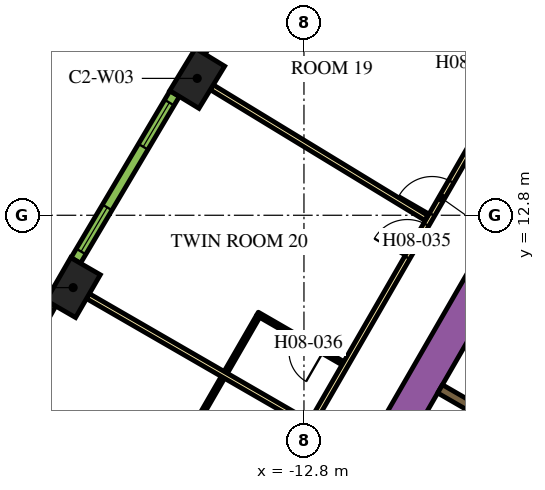
"""IFC4 building model, lengths in metres.
Left out: names, types, materials, properties, quantities, classifications, styles, units other than length and angle.
Written with IfcOpenShell. Run it as: python <this file> out.ifc"""

import sys

from ifc_helpers import new_model, si_unit, direction, frame, frame_2d, origin, origin_2d, place, context, subcontext, project, spatial, rectangle, extrude, element, fill, save


model = new_model("IFC4")
c1 = context("Model", 3, precision=1e-05, world=origin(), true_north=direction((0.0, 1.0)))
c2 = subcontext(c1, "Body", "Model", "MODEL_VIEW")
j1 = project(units=[si_unit("LENGTHUNIT", "METRE"), si_unit("PLANEANGLEUNIT", "RADIAN")], contexts=[c1])
p1 = place(None, origin())
s1 = spatial("IfcSite", under=j1, at=p1, CompositionType="ELEMENT")
p2 = place(p1, origin())
s2 = spatial("IfcBuilding", under=s1, at=p2, CompositionType="ELEMENT")
p3 = place(p2, frame((0.0, 0.0, 111.0)))
s3 = spatial("IfcBuildingStorey", under=s2, at=p3, CompositionType="ELEMENT", Elevation=111.0)
for number, where, z_axis, x_axis in (
    (1, (-15.609, 16.402, 0.0), (0.0, 0.0, 1.0), (-0.52, -0.854, 0.0)),
    (2, (-18.874, 10.897, 0.0), (0.0, 0.0, 1.0), (-0.5, -0.866, 0.0)),
):
    element("IfcColumn", number, at=place(p3, frame(where, z_axis=z_axis, x_axis=x_axis)), inside=s3, PredefinedType="COLUMN", context=c2, shape_type="SweptSolid", body=[
        extrude(rectangle(XDim=1.3, YDim=0.9, at=origin_2d()), origin(), (0.0, 0.0, 1.0), 3.9),
    ])
p4 = place(p3, frame((-15.36, -1.503, 0.0), z_axis=(0.0, 0.0, 1.0), x_axis=(0.50000389221, 0.866023156604, 0.0)))
e3 = element("IfcWall", 3, at=p4, inside=s3, PredefinedType="SOLIDWALL", context=c2, shape_type="SweptSolid", body=[
    extrude(rectangle(XDim=21.0, YDim=0.9, at=frame_2d((10.5, 0.0))), origin(), (0.0, 0.0, 1.0), 3.9),
])
p5 = place(p3, frame((-7.314, 7.132, 0.0), z_axis=(0.0, 0.0, 1.0), x_axis=(-0.866008176907, 0.50002983664, 0.0)))
e4 = element("IfcWall", 4, at=p5, inside=s3, PredefinedType="SOLIDWALL", context=c2, shape_type="SweptSolid", body=[
    extrude(rectangle(XDim=2.2, YDim=0.25, at=frame_2d((1.1, 0.0))), origin(), (0.0, 0.0, 1.0), 3.9),
])
p6 = place(p3, frame((-6.008, 9.144, 0.0), z_axis=(0.0, 0.0, 1.0), x_axis=(-0.500006956611, -0.866021387346, 0.0)))
e5 = element("IfcWall", 5, at=p6, inside=s3, PredefinedType="SOLIDWALL", context=c2, shape_type="SweptSolid", body=[
    extrude(rectangle(XDim=9.83, YDim=0.25, at=frame_2d((4.915, 0.0))), origin(), (0.0, 0.0, 1.0), 3.9),
])
p7 = place(p6, frame((6.985, 0.0, 0.0)))
e6 = element("IfcOpeningElement", 6, at=p7, cuts=e5, PredefinedType="OPENING", context=c2, shape_type="SweptSolid", body=[
    extrude(rectangle(XDim=0.9, YDim=2.1, at=frame_2d((0.45, 1.05))), frame((0.0, 0.135, 0.0), z_axis=(0.0, -1.0, 0.0), x_axis=(1.0, 0.0, 0.0)), (0.0, 0.0, 1.0), 0.27),
])
p8 = place(p3, frame((-19.081, -3.9, 0.0), z_axis=(0.0, 0.0, 1.0), x_axis=(0.499998313975, 0.866026377209, 0.0)))
e7 = element("IfcWall", 7, at=p8, inside=s3, PredefinedType="PARTITIONING", context=c2, shape_type="SweptSolid", body=[
    extrude(rectangle(XDim=25.766, YDim=0.15, at=frame_2d((12.883, 0.0))), origin(), (0.0, 0.0, 1.0), 2.75),
])
p9 = place(p8, frame((19.306, 0.0, 0.0)))
e8 = element("IfcOpeningElement", 8, at=p9, cuts=e7, PredefinedType="OPENING", context=c2, shape_type="SweptSolid", body=[
    extrude(rectangle(XDim=1.0, YDim=2.1, at=frame_2d((0.5, 1.05))), frame((0.0, 0.085, 0.0), z_axis=(0.0, -1.0, 0.0), x_axis=(1.0, 0.0, 0.0)), (0.0, 0.0, 1.0), 0.17),
])
p10 = place(p8, frame((18.0, 0.0, 0.0)))
e9 = element("IfcOpeningElement", 9, at=p10, cuts=e7, PredefinedType="OPENING", context=c2, shape_type="SweptSolid", body=[
    extrude(rectangle(XDim=1.0, YDim=2.1, at=frame_2d((0.5, 1.05))), frame((0.0, 0.085, 0.0), z_axis=(0.0, -1.0, 0.0), x_axis=(1.0, 0.0, 0.0)), (0.0, 0.0, 1.0), 0.17),
])
p11 = place(p8, frame((6.838, 0.0, 0.0)))
e10 = element("IfcOpeningElement", 10, at=p11, cuts=e7, PredefinedType="OPENING", context=c2, shape_type="SweptSolid", body=[
    extrude(rectangle(XDim=1.0, YDim=2.1, at=frame_2d((0.5, 1.05))), frame((0.0, 0.085, 0.0), z_axis=(0.0, -1.0, 0.0), x_axis=(1.0, 0.0, 0.0)), (0.0, 0.0, 1.0), 0.17),
])
p12 = place(p8, frame((4.674, 0.0, 0.0)))
e11 = element("IfcOpeningElement", 11, at=p12, cuts=e7, PredefinedType="OPENING", context=c2, shape_type="SweptSolid", body=[
    extrude(rectangle(XDim=0.9, YDim=2.1, at=frame_2d((0.45, 1.05))), frame((0.0, 0.085, 0.0), z_axis=(0.0, -1.0, 0.0), x_axis=(1.0, 0.0, 0.0)), (0.0, 0.0, 1.0), 0.17),
])
p13 = place(p8, frame((0.18, 0.0, 0.0)))
e12 = element("IfcOpeningElement", 12, at=p13, cuts=e7, PredefinedType="OPENING", context=c2, shape_type="SweptSolid", body=[
    extrude(rectangle(XDim=1.0, YDim=2.1, at=frame_2d((0.5, 1.05))), frame((0.0, 0.085, 0.0), z_axis=(0.0, -1.0, 0.0), x_axis=(1.0, 0.0, 0.0)), (0.0, 0.0, 1.0), 0.17),
])
p14 = place(p3, frame((-18.484, 10.672, 0.0), z_axis=(0.0, 0.0, 1.0), x_axis=(0.866019162053, -0.50001081084, 0.0)))
e13 = element("IfcWall", 13, at=p14, inside=s3, PredefinedType="PARTITIONING", context=c2, shape_type="SweptSolid", body=[
    extrude(rectangle(XDim=6.694, YDim=0.15, at=frame_2d((3.347, 0.0))), origin(), (0.0, 0.0, 1.0), 2.75),
])
p15 = place(p3, frame((-15.225, 16.167, 0.0), z_axis=(0.0, 0.0, 1.0), x_axis=(0.854088713274, -0.520127359266, 0.0)))
e14 = element("IfcWall", 14, at=p15, inside=s3, PredefinedType="PARTITIONING", context=c2, shape_type="SweptSolid", body=[
    extrude(rectangle(XDim=6.611, YDim=0.15, at=frame_2d((3.305, 0.0))), origin(), (0.0, 0.0, 1.0), 2.75),
])
p16 = place(p3, frame((-9.864, 17.615, 0.0), z_axis=(0.0, 0.0, 1.0), x_axis=(0.866019956843, -0.50000943426, 0.0)))
e15 = element("IfcWall", 15, at=p16, inside=s3, PredefinedType="PARTITIONING", context=c2, shape_type="SweptSolid", body=[
    extrude(rectangle(XDim=2.7, YDim=0.1, at=frame_2d((1.35, 0.0))), origin(), (0.0, 0.0, 1.0), 2.75),
])
p17 = place(p16, frame((1.2, 0.0, 0.0)))
e16 = element("IfcOpeningElement", 16, at=p17, cuts=e15, PredefinedType="OPENING", context=c2, shape_type="SweptSolid", body=[
    extrude(rectangle(XDim=0.9, YDim=2.1, at=frame_2d((0.45, 1.05))), frame((0.0, 0.06, 0.0), z_axis=(0.0, -1.0, 0.0), x_axis=(1.0, 0.0, 0.0)), (0.0, 0.0, 1.0), 0.12),
])
p18 = place(p3, frame((-11.774, 8.906, 0.0), z_axis=(0.0, 0.0, 1.0), x_axis=(-0.865997922154, 0.500047596559, 0.0)))
e17 = element("IfcWall", 17, at=p18, inside=s3, PredefinedType="PARTITIONING", context=c2, shape_type="SweptSolid", body=[
    extrude(rectangle(XDim=2.6, YDim=0.1, at=frame_2d((1.3, 0.0))), origin(), (0.0, 0.0, 1.0), 2.75),
])
p19 = place(p18, frame((0.6, 0.0, 0.0)))
e18 = element("IfcOpeningElement", 18, at=p19, cuts=e17, PredefinedType="OPENING", context=c2, shape_type="SweptSolid", body=[
    extrude(rectangle(XDim=0.9, YDim=2.1, at=frame_2d((0.45, 1.05))), frame((0.0, 0.06, 0.0), z_axis=(0.0, -1.0, 0.0), x_axis=(1.0, 0.0, 0.0)), (0.0, 0.0, 1.0), 0.12),
])
for number, where, z_axis, x_axis in (
    (19, (-14.008, 10.138, 0.0), (0.0, 0.0, 1.0), (-0.5, -0.866, 0.0)),
    (20, (-15.783, 7.062, 0.0), (0.0, 0.0, 1.0), (0.5, 0.866, 0.0)),
):
    element("IfcWall", number, at=place(p3, frame(where, z_axis=z_axis, x_axis=x_axis)), inside=s3, PredefinedType="PARTITIONING", context=c2, shape_type="SweptSolid", body=[
        extrude(rectangle(XDim=1.7, YDim=0.1, at=frame_2d((0.85, 0.0))), origin(), (0.0, 0.0, 1.0), 2.75),
    ])
p20 = place(p3, frame((-12.82, 21.439, 0.0), z_axis=(0.0, 0.0, 1.0), x_axis=(-0.530072082134, -0.847952585787, 0.0)))
e21 = element("IfcWall", 21, at=p20, inside=s3, PredefinedType="SOLIDWALL", context=c2, shape_type="SweptSolid", body=[
    extrude(rectangle(XDim=5.1, YDim=0.29, at=frame_2d((2.55, 0.0))), origin(), (0.0, 0.0, 1.0), 3.65),
])
p21 = place(p20, frame((0.273, 0.0, 0.9)))
e22 = element("IfcOpeningElement", 22, at=p21, cuts=e21, PredefinedType="OPENING", context=c2, shape_type="SweptSolid", body=[
    extrude(rectangle(XDim=1.35, YDim=2.15, at=frame_2d((0.675, 1.075))), frame((0.0, 0.155, 0.0), z_axis=(0.0, -1.0, 0.0), x_axis=(1.0, 0.0, 0.0)), (0.0, 0.0, 1.0), 0.31),
])
p22 = place(p20, frame((3.478, 0.0, 0.9)))
e23 = element("IfcOpeningElement", 23, at=p22, cuts=e21, PredefinedType="OPENING", context=c2, shape_type="SweptSolid", body=[
    extrude(rectangle(XDim=1.35, YDim=2.15, at=frame_2d((0.675, 1.075))), frame((0.0, 0.155, 0.0), z_axis=(0.0, -1.0, 0.0), x_axis=(1.0, 0.0, 0.0)), (0.0, 0.0, 1.0), 0.31),
])
p23 = place(p3, frame((-16.203, 15.998, 0.0), z_axis=(0.0, 0.0, 1.0), x_axis=(-0.510054281659, -0.860142214847, 0.0)))
e24 = element("IfcWall", 24, at=p23, inside=s3, PredefinedType="SOLIDWALL", context=c2, shape_type="SweptSolid", body=[
    extrude(rectangle(XDim=5.101, YDim=0.29, at=frame_2d((2.55, 0.0))), origin(), (0.0, 0.0, 1.0), 3.65),
])
p24 = place(p23, frame((0.273, 0.0, 0.9)))
e25 = element("IfcOpeningElement", 25, at=p24, cuts=e24, PredefinedType="OPENING", context=c2, shape_type="SweptSolid", body=[
    extrude(rectangle(XDim=1.35, YDim=2.15, at=frame_2d((0.675, 1.075))), frame((0.0, 0.155, 0.0), z_axis=(0.0, -1.0, 0.0), x_axis=(1.0, 0.0, 0.0)), (0.0, 0.0, 1.0), 0.31),
])
p25 = place(p23, frame((3.478, 0.0, 0.9)))
e26 = element("IfcOpeningElement", 26, at=p25, cuts=e24, PredefinedType="OPENING", context=c2, shape_type="SweptSolid", body=[
    extrude(rectangle(XDim=1.35, YDim=2.15, at=frame_2d((0.675, 1.075))), frame((0.0, 0.155, 0.0), z_axis=(0.0, -1.0, 0.0), x_axis=(1.0, 0.0, 0.0)), (0.0, 0.0, 1.0), 0.31),
])
p26 = place(p3, frame((-19.458, 10.48, 0.0), z_axis=(0.0, 0.0, 1.0), x_axis=(-0.48983164787, -0.87181704316, 0.0)))
e27 = element("IfcWall", 27, at=p26, inside=s3, PredefinedType="SOLIDWALL", context=c2, shape_type="SweptSolid", body=[
    extrude(rectangle(XDim=5.1, YDim=0.29, at=frame_2d((2.55, 0.0))), origin(), (0.0, 0.0, 1.0), 3.65),
])
p27 = place(p26, frame((0.272, 0.0, 0.9)))
e28 = element("IfcOpeningElement", 28, at=p27, cuts=e27, PredefinedType="OPENING", context=c2, shape_type="SweptSolid", body=[
    extrude(rectangle(XDim=1.35, YDim=2.15, at=frame_2d((0.675, 1.075))), frame((0.0, 0.155, 0.0), z_axis=(0.0, -1.0, 0.0), x_axis=(1.0, 0.0, 0.0)), (0.0, 0.0, 1.0), 0.31),
])
p28 = place(p26, frame((3.478, 0.0, 0.9)))
e29 = element("IfcOpeningElement", 29, at=p28, cuts=e27, PredefinedType="OPENING", context=c2, shape_type="SweptSolid", body=[
    extrude(rectangle(XDim=1.35, YDim=2.15, at=frame_2d((0.675, 1.075))), frame((0.0, 0.155, 0.0), z_axis=(0.0, -1.0, 0.0), x_axis=(1.0, 0.0, 0.0)), (0.0, 0.0, 1.0), 0.31),
])
p29 = place(p9, origin())
e30 = element("IfcDoor", 30, at=p29, inside=s3, OperationType="SINGLE_SWING_LEFT", PredefinedType="DOOR", context=c2, shape_type="SweptSolid", body=[
    extrude(rectangle(XDim=1.0, YDim=2.1, at=frame_2d((0.5, 1.05))), frame((0.0, 0.025, 0.0), z_axis=(0.0, -1.0, 0.0), x_axis=(1.0, 0.0, 0.0)), (0.0, 0.0, 1.0), 0.05),
])
fill(e8, e30)
p30 = place(p17, origin())
e31 = element("IfcDoor", 31, at=p30, inside=s3, OperationType="SINGLE_SWING_LEFT", PredefinedType="DOOR", context=c2, shape_type="SweptSolid", body=[
    extrude(rectangle(XDim=0.9, YDim=2.1, at=frame_2d((0.45, 1.05))), frame((0.0, 0.025, 0.0), z_axis=(0.0, -1.0, 0.0), x_axis=(1.0, 0.0, 0.0)), (0.0, 0.0, 1.0), 0.05),
])
fill(e16, e31)
p31 = place(p10, origin())
e32 = element("IfcDoor", 32, at=p31, inside=s3, OperationType="SINGLE_SWING_RIGHT", PredefinedType="DOOR", context=c2, shape_type="SweptSolid", body=[
    extrude(rectangle(XDim=1.0, YDim=2.1, at=frame_2d((0.5, 1.05))), frame((0.0, 0.025, 0.0), z_axis=(0.0, -1.0, 0.0), x_axis=(1.0, 0.0, 0.0)), (0.0, 0.0, 1.0), 0.05),
])
fill(e9, e32)
p32 = place(p19, origin())
e33 = element("IfcDoor", 33, at=p32, inside=s3, OperationType="SINGLE_SWING_LEFT", PredefinedType="DOOR", context=c2, shape_type="SweptSolid", body=[
    extrude(rectangle(XDim=0.9, YDim=2.1, at=frame_2d((0.45, 1.05))), frame((0.0, 0.025, 0.0), z_axis=(0.0, -1.0, 0.0), x_axis=(1.0, 0.0, 0.0)), (0.0, 0.0, 1.0), 0.05),
])
fill(e18, e33)
p33 = place(p24, origin())
e34 = element("IfcWindow", 34, at=p33, inside=s3, PartitioningType="DOUBLE_PANEL_VERTICAL", PredefinedType="WINDOW", context=c2, shape_type="SweptSolid", body=[
    extrude(rectangle(XDim=1.35, YDim=2.15, at=frame_2d((0.675, 1.075))), frame((0.0, 0.015, 0.0), z_axis=(0.0, -1.0, 0.0), x_axis=(1.0, 0.0, 0.0)), (0.0, 0.0, 1.0), 0.06),
])
fill(e25, e34)
p34 = place(p25, origin())
e35 = element("IfcWindow", 35, at=p34, inside=s3, PartitioningType="DOUBLE_PANEL_VERTICAL", PredefinedType="WINDOW", context=c2, shape_type="SweptSolid", body=[
    extrude(rectangle(XDim=1.35, YDim=2.15, at=frame_2d((0.675, 1.075))), frame((0.0, 0.015, 0.0), z_axis=(0.0, -1.0, 0.0), x_axis=(1.0, 0.0, 0.0)), (0.0, 0.0, 1.0), 0.06),
])
fill(e26, e35)
save(model, sys.argv[1])
